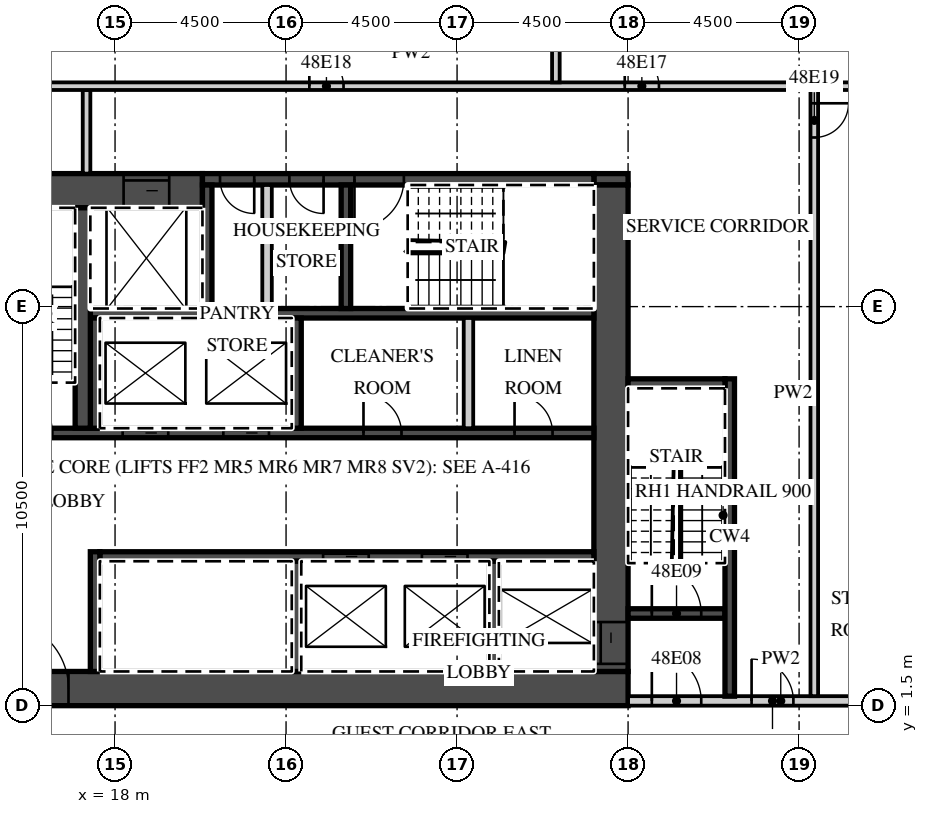
"""IFC4 building model, lengths in metres.
Left out: names, types, materials, properties, quantities, classifications, styles, units other than length and angle.
Written with IfcOpenShell. Run it as: python <this file> out.ifc"""

import sys

from ifc_helpers import new_model, si_unit, direction, frame, frame_2d, origin, place, context, subcontext, project, spatial, rectangle, extrude, element, fill, save


model = new_model("IFC4")
c1 = context("Model", 3, precision=1e-05, world=origin(), true_north=direction((0.0, 1.0)))
c2 = subcontext(c1, "Body", "Model", "MODEL_VIEW")
j1 = project(units=[si_unit("LENGTHUNIT", "METRE"), si_unit("PLANEANGLEUNIT", "RADIAN")], contexts=[c1])
p1 = place(None, origin())
s1 = spatial("IfcSite", under=j1, at=p1, CompositionType="ELEMENT")
p2 = place(p1, origin())
s2 = spatial("IfcBuilding", under=s1, at=p2, CompositionType="ELEMENT")
p3 = place(p2, frame((0.0, 0.0, 199.9)))
s3 = spatial("IfcBuildingStorey", under=s2, at=p3, CompositionType="ELEMENT", Elevation=199.9)
p4 = place(p3, frame((13.5, 1.95, 0.0), z_axis=(0.0, 0.0, 1.0), x_axis=(1.0, 0.0, 0.0)))
e1 = element("IfcWall", 1, at=p4, inside=s3, PredefinedType="SHEAR", context=c2, shape_type="SweptSolid", body=[
    extrude(rectangle(XDim=18.0, YDim=0.9, at=frame_2d((9.0, 0.0))), origin(), (0.0, 0.0, 1.0), 3.02),
])
p5 = place(p4, frame((1.475, 0.0, 0.0)))
e2 = element("IfcOpeningElement", 2, at=p5, cuts=e1, PredefinedType="OPENING", context=c2, shape_type="SweptSolid", body=[
    extrude(rectangle(XDim=1.8, YDim=2.1, at=frame_2d((0.9, 1.05))), frame((0.0, 0.46, 0.0), z_axis=(0.0, -1.0, 0.0), x_axis=(1.0, 0.0, 0.0)), (0.0, 0.0, 1.0), 0.92),
])
p6 = place(p3, frame((13.5, 15.05, 0.0), z_axis=(0.0, 0.0, 1.0), x_axis=(1.0, 0.0, 0.0)))
e3 = element("IfcWall", 3, at=p6, inside=s3, PredefinedType="SHEAR", context=c2, shape_type="SweptSolid", body=[
    extrude(rectangle(XDim=6.8, YDim=0.9, at=frame_2d((3.4, 0.0))), origin(), (0.0, 0.0, 1.0), 3.02),
])
p7 = place(p6, frame((4.725, 0.0, 0.0)))
e4 = element("IfcOpeningElement", 4, at=p7, cuts=e3, PredefinedType="OPENING", context=c2, shape_type="SweptSolid", body=[
    extrude(rectangle(XDim=1.2, YDim=2.1, at=frame_2d((0.6, 1.05))), frame((0.0, 0.46, 0.0), z_axis=(0.0, -1.0, 0.0), x_axis=(1.0, 0.0, 0.0)), (0.0, 0.0, 1.0), 0.92),
])
p8 = place(p3, frame((30.6, 15.35, 0.0), z_axis=(0.0, 0.0, 1.0), x_axis=(1.0, 0.0, 0.0)))
e5 = element("IfcWall", 5, at=p8, inside=s3, PredefinedType="SHEAR", context=c2, shape_type="SweptSolid", body=[
    extrude(rectangle(XDim=0.9, YDim=0.3, at=frame_2d((0.45, 0.0))), origin(), (0.0, 0.0, 1.0), 3.02),
])
p9 = place(p3, frame((20.3, 15.35, 0.0), z_axis=(0.0, 0.0, 1.0), x_axis=(1.0, 0.0, 0.0)))
e6 = element("IfcWall", 6, at=p9, inside=s3, PredefinedType="SHEAR", context=c2, shape_type="SweptSolid", body=[
    extrude(rectangle(XDim=10.3, YDim=0.3, at=frame_2d((5.15, 0.0))), origin(), (0.0, 0.0, 1.0), 3.02),
])
p10 = place(p9, frame((4.0, 0.0, 0.0)))
e7 = element("IfcOpeningElement", 7, at=p10, cuts=e6, PredefinedType="OPENING", context=c2, shape_type="SweptSolid", body=[
    extrude(rectangle(XDim=1.3, YDim=2.1, at=frame_2d((0.65, 1.05))), frame((0.0, 0.16, 0.0), z_axis=(0.0, -1.0, 0.0), x_axis=(1.0, 0.0, 0.0)), (0.0, 0.0, 1.0), 0.32),
])
p11 = place(p9, frame((2.288, 0.0, 0.0)))
e8 = element("IfcOpeningElement", 8, at=p11, cuts=e6, PredefinedType="OPENING", context=c2, shape_type="SweptSolid", body=[
    extrude(rectangle(XDim=0.9, YDim=2.1, at=frame_2d((0.45, 1.05))), frame((0.0, 0.16, 0.0), z_axis=(0.0, -1.0, 0.0), x_axis=(1.0, 0.0, 0.0)), (0.0, 0.0, 1.0), 0.32),
])
p12 = place(p9, frame((0.462, 0.0, 0.0)))
e9 = element("IfcOpeningElement", 9, at=p12, cuts=e6, PredefinedType="OPENING", context=c2, shape_type="SweptSolid", body=[
    extrude(rectangle(XDim=0.9, YDim=2.1, at=frame_2d((0.45, 1.05))), frame((0.0, 0.16, 0.0), z_axis=(0.0, -1.0, 0.0), x_axis=(1.0, 0.0, 0.0)), (0.0, 0.0, 1.0), 0.32),
])
p13 = place(p3, frame((31.05, 2.4, 0.0), z_axis=(0.0, 0.0, 1.0), x_axis=(0.0, 1.0, 0.0)))
e10 = element("IfcWall", 10, at=p13, inside=s3, PredefinedType="SHEAR", context=c2, shape_type="SweptSolid", body=[
    extrude(rectangle(XDim=12.8, YDim=0.9, at=frame_2d((6.4, 0.0))), origin(), (0.0, 0.0, 1.0), 3.02),
])
p14 = place(p13, frame((0.2, 0.0, 0.0)))
e11 = element("IfcOpeningElement", 11, at=p14, cuts=e10, PredefinedType="OPENING", context=c2, shape_type="SweptSolid", body=[
    extrude(rectangle(XDim=1.1, YDim=2.1, at=frame_2d((0.55, 1.05))), frame((0.0, 0.46, 0.0), z_axis=(0.0, -1.0, 0.0), x_axis=(1.0, 0.0, 0.0)), (0.0, 0.0, 1.0), 0.92),
])
p15 = place(p3, frame((17.6, 5.425, 0.0), z_axis=(0.0, 0.0, 1.0), x_axis=(1.0, 0.0, 0.0)))
e12 = element("IfcWall", 12, at=p15, inside=s3, PredefinedType="SHEAR", context=c2, shape_type="SweptSolid", body=[
    extrude(rectangle(XDim=13.0, YDim=0.25, at=frame_2d((6.5, 0.0))), origin(), (0.0, 0.0, 1.0), 3.02),
])
p16 = place(p15, frame((8.475, 0.0, 0.0)))
e13 = element("IfcOpeningElement", 13, at=p16, cuts=e12, PredefinedType="OPENING", context=c2, shape_type="SweptSolid", body=[
    extrude(rectangle(XDim=1.2, YDim=2.1, at=frame_2d((0.6, 1.05))), frame((0.0, 0.135, 0.0), z_axis=(0.0, -1.0, 0.0), x_axis=(1.0, 0.0, 0.0)), (0.0, 0.0, 1.0), 0.27),
])
p17 = place(p15, frame((5.875, 0.0, 0.0)))
e14 = element("IfcOpeningElement", 14, at=p17, cuts=e12, PredefinedType="OPENING", context=c2, shape_type="SweptSolid", body=[
    extrude(rectangle(XDim=1.2, YDim=2.1, at=frame_2d((0.6, 1.05))), frame((0.0, 0.135, 0.0), z_axis=(0.0, -1.0, 0.0), x_axis=(1.0, 0.0, 0.0)), (0.0, 0.0, 1.0), 0.27),
])
p18 = place(p3, frame((17.475, 2.4, 0.0), z_axis=(0.0, 0.0, 1.0), x_axis=(0.0, 1.0, 0.0)))
e15 = element("IfcWall", 15, at=p18, inside=s3, PredefinedType="SHEAR", context=c2, shape_type="SweptSolid", body=[
    extrude(rectangle(XDim=3.15, YDim=0.25, at=frame_2d((1.575, 0.0))), origin(), (0.0, 0.0, 1.0), 3.02),
])
for number, where, z_axis, x_axis in (
    (16, (27.975, 2.4, 0.0), (0.0, 0.0, 1.0), (0.0, 1.0, 0.0)),
    (17, (22.775, 2.4, 0.0), (0.0, 0.0, 1.0), (0.0, 1.0, 0.0)),
):
    element("IfcWall", number, at=place(p3, frame(where, z_axis=z_axis, x_axis=x_axis)), inside=s3, PredefinedType="SHEAR", context=c2, shape_type="SweptSolid", body=[
        extrude(rectangle(XDim=2.9, YDim=0.25, at=frame_2d((1.45, 0.0))), origin(), (0.0, 0.0, 1.0), 3.02),
    ])
p19 = place(p3, frame((14.4, 8.675, 0.0), z_axis=(0.0, 0.0, 1.0), x_axis=(1.0, 0.0, 0.0)))
e18 = element("IfcWall", 18, at=p19, inside=s3, PredefinedType="SHEAR", context=c2, shape_type="SweptSolid", body=[
    extrude(rectangle(XDim=16.2, YDim=0.25, at=frame_2d((8.1, 0.0))), origin(), (0.0, 0.0, 1.0), 3.02),
])
p20 = place(p19, frame((6.45, 0.0, 0.0)))
e19 = element("IfcOpeningElement", 19, at=p20, cuts=e18, PredefinedType="OPENING", context=c2, shape_type="SweptSolid", body=[
    extrude(rectangle(XDim=1.2, YDim=2.1, at=frame_2d((0.6, 1.05))), frame((0.0, 0.135, 0.0), z_axis=(0.0, -1.0, 0.0), x_axis=(1.0, 0.0, 0.0)), (0.0, 0.0, 1.0), 0.27),
])
p21 = place(p19, frame((3.8, 0.0, 0.0)))
e20 = element("IfcOpeningElement", 20, at=p21, cuts=e18, PredefinedType="OPENING", context=c2, shape_type="SweptSolid", body=[
    extrude(rectangle(XDim=1.2, YDim=2.1, at=frame_2d((0.6, 1.05))), frame((0.0, 0.135, 0.0), z_axis=(0.0, -1.0, 0.0), x_axis=(1.0, 0.0, 0.0)), (0.0, 0.0, 1.0), 0.27),
])
p22 = place(p19, frame((0.65, 0.0, 0.0)))
e21 = element("IfcOpeningElement", 21, at=p22, cuts=e18, PredefinedType="OPENING", context=c2, shape_type="SweptSolid", body=[
    extrude(rectangle(XDim=1.3, YDim=2.1, at=frame_2d((0.65, 1.05))), frame((0.0, 0.135, 0.0), z_axis=(0.0, -1.0, 0.0), x_axis=(1.0, 0.0, 0.0)), (0.0, 0.0, 1.0), 0.27),
])
p23 = place(p19, frame((14.113, 0.0, 0.0)))
e22 = element("IfcOpeningElement", 22, at=p23, cuts=e18, PredefinedType="OPENING", context=c2, shape_type="SweptSolid", body=[
    extrude(rectangle(XDim=1.0, YDim=2.1, at=frame_2d((0.5, 1.05))), frame((0.0, 0.135, 0.0), z_axis=(0.0, -1.0, 0.0), x_axis=(1.0, 0.0, 0.0)), (0.0, 0.0, 1.0), 0.27),
])
p24 = place(p19, frame((10.137, 0.0, 0.0)))
e23 = element("IfcOpeningElement", 23, at=p24, cuts=e18, PredefinedType="OPENING", context=c2, shape_type="SweptSolid", body=[
    extrude(rectangle(XDim=1.0, YDim=2.1, at=frame_2d((0.5, 1.05))), frame((0.0, 0.135, 0.0), z_axis=(0.0, -1.0, 0.0), x_axis=(1.0, 0.0, 0.0)), (0.0, 0.0, 1.0), 0.27),
])
p25 = place(p3, frame((17.35, 11.825, 0.0), z_axis=(0.0, 0.0, 1.0), x_axis=(1.0, 0.0, 0.0)))
e24 = element("IfcWall", 24, at=p25, inside=s3, PredefinedType="SHEAR", context=c2, shape_type="SweptSolid", body=[
    extrude(rectangle(XDim=13.25, YDim=0.25, at=frame_2d((6.625, 0.0))), origin(), (0.0, 0.0, 1.0), 3.02),
])
for number, where, z_axis, x_axis in (
    (25, (17.475, 8.8, 0.0), (0.0, 0.0, 1.0), (0.0, 1.0, 0.0)),
    (26, (22.775, 8.8, 0.0), (0.0, 0.0, 1.0), (0.0, 1.0, 0.0)),
):
    element("IfcWall", number, at=place(p3, frame(where, z_axis=z_axis, x_axis=x_axis)), inside=s3, PredefinedType="SHEAR", context=c2, shape_type="SweptSolid", body=[
        extrude(rectangle(XDim=2.9, YDim=0.25, at=frame_2d((1.45, 0.0))), origin(), (0.0, 0.0, 1.0), 3.02),
    ])
p26 = place(p3, frame((27.3, 8.8, 0.0), z_axis=(0.0, 0.0, 1.0), x_axis=(0.0, 1.0, 0.0)))
e27 = element("IfcWall", 27, at=p26, inside=s3, PredefinedType="PARTITIONING", context=c2, shape_type="SweptSolid", body=[
    extrude(rectangle(XDim=2.9, YDim=0.25, at=frame_2d((1.45, 0.0))), origin(), (0.0, 0.0, 1.0), 3.02),
])
p27 = place(p3, frame((17.15, 8.8, 0.0), z_axis=(0.0, 0.0, 1.0), x_axis=(0.0, 1.0, 0.0)))
e28 = element("IfcWall", 28, at=p27, inside=s3, PredefinedType="SHEAR", context=c2, shape_type="SweptSolid", body=[
    extrude(rectangle(XDim=5.8, YDim=0.4, at=frame_2d((2.9, 0.0))), origin(), (0.0, 0.0, 1.0), 3.02),
])
for number, where, z_axis, x_axis in (
    (29, (20.425, 11.95, 0.0), (0.0, 0.0, 1.0), (0.0, 1.0, 0.0)),
    (30, (24.075, 11.95, 0.0), (0.0, 0.0, 1.0), (0.0, 1.0, 0.0)),
):
    element("IfcWall", number, at=place(p3, frame(where, z_axis=z_axis, x_axis=x_axis)), inside=s3, PredefinedType="SHEAR", context=c2, shape_type="SweptSolid", body=[
        extrude(rectangle(XDim=3.25, YDim=0.25, at=frame_2d((1.625, 0.0))), origin(), (0.0, 0.0, 1.0), 3.02),
    ])
p28 = place(p3, frame((22.0, 11.95, 0.0), z_axis=(0.0, 0.0, 1.0), x_axis=(0.0, 1.0, 0.0)))
e31 = element("IfcWall", 31, at=p28, inside=s3, PredefinedType="PARTITIONING", context=c2, shape_type="SweptSolid", body=[
    extrude(rectangle(XDim=3.25, YDim=0.25, at=frame_2d((1.625, 0.0))), origin(), (0.0, 0.0, 1.0), 3.02),
])
p29 = place(p3, frame((31.5, 1.625, 0.0), z_axis=(0.0, 0.0, 1.0), x_axis=(1.0, 0.0, 0.0)))
e32 = element("IfcWall", 32, at=p29, inside=s3, PredefinedType="PARTITIONING", context=c2, shape_type="SweptSolid", body=[
    extrude(rectangle(XDim=8.035, YDim=0.25, at=frame_2d((4.018, 0.0))), origin(), (0.0, 0.0, 1.0), 3.02),
])
p30 = place(p29, frame((0.625, 0.0, 0.0)))
e33 = element("IfcOpeningElement", 33, at=p30, cuts=e32, PredefinedType="OPENING", context=c2, shape_type="SweptSolid", body=[
    extrude(rectangle(XDim=1.3, YDim=2.1, at=frame_2d((0.65, 1.05))), frame((0.0, 0.135, 0.0), z_axis=(0.0, -1.0, 0.0), x_axis=(1.0, 0.0, 0.0)), (0.0, 0.0, 1.0), 0.27),
])
p31 = place(p29, frame((3.25, 0.0, 0.0)))
e34 = element("IfcOpeningElement", 34, at=p31, cuts=e32, PredefinedType="OPENING", context=c2, shape_type="SweptSolid", body=[
    extrude(rectangle(XDim=1.1, YDim=2.1, at=frame_2d((0.55, 1.05))), frame((0.0, 0.135, 0.0), z_axis=(0.0, -1.0, 0.0), x_axis=(1.0, 0.0, 0.0)), (0.0, 0.0, 1.0), 0.27),
])
p32 = place(p3, frame((31.5, 3.925, 0.0), z_axis=(0.0, 0.0, 1.0), x_axis=(1.0, 0.0, 0.0)))
e35 = element("IfcWall", 35, at=p32, inside=s3, PredefinedType="SHEAR", context=c2, shape_type="SweptSolid", body=[
    extrude(rectangle(XDim=2.55, YDim=0.25, at=frame_2d((1.275, 0.0))), origin(), (0.0, 0.0, 1.0), 3.02),
])
p33 = place(p32, frame((0.625, 0.0, 0.0)))
e36 = element("IfcOpeningElement", 36, at=p33, cuts=e35, PredefinedType="OPENING", context=c2, shape_type="SweptSolid", body=[
    extrude(rectangle(XDim=1.3, YDim=2.1, at=frame_2d((0.65, 1.05))), frame((0.0, 0.135, 0.0), z_axis=(0.0, -1.0, 0.0), x_axis=(1.0, 0.0, 0.0)), (0.0, 0.0, 1.0), 0.27),
])
p34 = place(p3, frame((34.175, 1.75, 0.0), z_axis=(0.0, 0.0, 1.0), x_axis=(0.0, 1.0, 0.0)))
e37 = element("IfcWall", 37, at=p34, inside=s3, PredefinedType="SHEAR", context=c2, shape_type="SweptSolid", body=[
    extrude(rectangle(XDim=8.35, YDim=0.25, at=frame_2d((4.175, 0.0))), origin(), (0.0, 0.0, 1.0), 3.02),
])
p35 = place(p3, frame((31.5, 9.975, 0.0), z_axis=(0.0, 0.0, 1.0), x_axis=(1.0, 0.0, 0.0)))
e38 = element("IfcWall", 38, at=p35, inside=s3, PredefinedType="SHEAR", context=c2, shape_type="SweptSolid", body=[
    extrude(rectangle(XDim=2.55, YDim=0.25, at=frame_2d((1.275, 0.0))), origin(), (0.0, 0.0, 1.0), 3.02),
])
p36 = place(p3, frame((17.25, 15.5, 0.0), z_axis=(0.0, 0.0, 1.0), x_axis=(0.0, 1.0, 0.0)))
e39 = element("IfcWall", 39, at=p36, inside=s3, PredefinedType="PARTITIONING", context=c2, shape_type="SweptSolid", body=[
    extrude(rectangle(XDim=2.2, YDim=0.2, at=frame_2d((1.1, 0.0))), origin(), (0.0, 0.0, 1.0), 3.02),
])
p37 = place(p3, frame((36.4, 1.75, 0.0), z_axis=(0.0, 0.0, 1.0), x_axis=(0.0, 1.0, 0.0)))
e40 = element("IfcWall", 40, at=p37, inside=s3, PredefinedType="PARTITIONING", context=c2, shape_type="SweptSolid", body=[
    extrude(rectangle(XDim=15.95, YDim=0.2, at=frame_2d((7.975, 0.0))), origin(), (0.0, 0.0, 1.0), 3.02),
])
p38 = place(p37, frame((14.7, 0.0, 0.0)))
e41 = element("IfcOpeningElement", 41, at=p38, cuts=e40, PredefinedType="OPENING", context=c2, shape_type="SweptSolid", body=[
    extrude(rectangle(XDim=0.9, YDim=2.1, at=frame_2d((0.45, 1.05))), frame((0.0, 0.11, 0.0), z_axis=(0.0, -1.0, 0.0), x_axis=(1.0, 0.0, 0.0)), (0.0, 0.0, 1.0), 0.22),
])
p39 = place(p3, frame((13.6, 17.8, 0.0), z_axis=(0.0, 0.0, 1.0), x_axis=(1.0, 0.0, 0.0)))
e42 = element("IfcWall", 42, at=p39, inside=s3, PredefinedType="PARTITIONING", context=c2, shape_type="SweptSolid", body=[
    extrude(rectangle(XDim=24.378, YDim=0.2, at=frame_2d((12.189, 0.0))), origin(), (0.0, 0.0, 1.0), 3.02),
])
p40 = place(p39, frame((17.812, 0.0, 0.0)))
e43 = element("IfcOpeningElement", 43, at=p40, cuts=e42, PredefinedType="OPENING", context=c2, shape_type="SweptSolid", body=[
    extrude(rectangle(XDim=0.9, YDim=2.1, at=frame_2d((0.45, 1.05))), frame((0.0, 0.11, 0.0), z_axis=(0.0, -1.0, 0.0), x_axis=(1.0, 0.0, 0.0)), (0.0, 0.0, 1.0), 0.22),
])
p41 = place(p39, frame((9.512, 0.0, 0.0)))
e44 = element("IfcOpeningElement", 44, at=p41, cuts=e42, PredefinedType="OPENING", context=c2, shape_type="SweptSolid", body=[
    extrude(rectangle(XDim=0.9, YDim=2.1, at=frame_2d((0.45, 1.05))), frame((0.0, 0.11, 0.0), z_axis=(0.0, -1.0, 0.0), x_axis=(1.0, 0.0, 0.0)), (0.0, 0.0, 1.0), 0.22),
])
p42 = place(p3, frame((29.6, 17.9, 0.0), z_axis=(0.0, 0.0, 1.0), x_axis=(0.0, 1.0, 0.0)))
e45 = element("IfcWall", 45, at=p42, inside=s3, PredefinedType="PARTITIONING", context=c2, shape_type="SweptSolid", body=[
    extrude(rectangle(XDim=5.241, YDim=0.2, at=frame_2d((2.62, 0.0))), origin(), (0.0, 0.0, 1.0), 3.02),
])
p43 = place(p20, origin())
e46 = element("IfcDoor", 46, at=p43, inside=s3, OperationType="SLIDING_TO_LEFT", PredefinedType="DOOR", context=c2, shape_type="SweptSolid", body=[
    extrude(rectangle(XDim=1.2, YDim=2.1, at=frame_2d((0.6, 1.05))), frame((0.0, 0.025, 0.0), z_axis=(0.0, -1.0, 0.0), x_axis=(1.0, 0.0, 0.0)), (0.0, 0.0, 1.0), 0.05),
])
fill(e19, e46)
p44 = place(p21, origin())
e47 = element("IfcDoor", 47, at=p44, inside=s3, OperationType="SLIDING_TO_RIGHT", PredefinedType="DOOR", context=c2, shape_type="SweptSolid", body=[
    extrude(rectangle(XDim=1.2, YDim=2.1, at=frame_2d((0.6, 1.05))), frame((0.0, 0.025, 0.0), z_axis=(0.0, -1.0, 0.0), x_axis=(1.0, 0.0, 0.0)), (0.0, 0.0, 1.0), 0.05),
])
fill(e20, e47)
p45 = place(p16, origin())
e48 = element("IfcDoor", 48, at=p45, inside=s3, OperationType="SLIDING_TO_LEFT", PredefinedType="DOOR", context=c2, shape_type="SweptSolid", body=[
    extrude(rectangle(XDim=1.2, YDim=2.1, at=frame_2d((0.6, 1.05))), frame((0.0, 0.025, 0.0), z_axis=(0.0, -1.0, 0.0), x_axis=(1.0, 0.0, 0.0)), (0.0, 0.0, 1.0), 0.05),
])
fill(e13, e48)
p46 = place(p17, origin())
e49 = element("IfcDoor", 49, at=p46, inside=s3, OperationType="SLIDING_TO_RIGHT", PredefinedType="DOOR", context=c2, shape_type="SweptSolid", body=[
    extrude(rectangle(XDim=1.2, YDim=2.1, at=frame_2d((0.6, 1.05))), frame((0.0, 0.025, 0.0), z_axis=(0.0, -1.0, 0.0), x_axis=(1.0, 0.0, 0.0)), (0.0, 0.0, 1.0), 0.05),
])
fill(e14, e49)
p47 = place(p7, origin())
e50 = element("IfcDoor", 50, at=p47, inside=s3, OperationType="SLIDING_TO_LEFT", PredefinedType="DOOR", context=c2, shape_type="SweptSolid", body=[
    extrude(rectangle(XDim=1.2, YDim=2.1, at=frame_2d((0.6, 1.05))), frame((0.0, 0.025, 0.0), z_axis=(0.0, -1.0, 0.0), x_axis=(1.0, 0.0, 0.0)), (0.0, 0.0, 1.0), 0.05),
])
fill(e4, e50)
p48 = place(p14, origin())
e51 = element("IfcDoor", 51, at=p48, inside=s3, OperationType="SLIDING_TO_LEFT", PredefinedType="DOOR", context=c2, shape_type="SweptSolid", body=[
    extrude(rectangle(XDim=1.1, YDim=2.1, at=frame_2d((0.55, 1.05))), frame((0.0, 0.025, 0.0), z_axis=(0.0, -1.0, 0.0), x_axis=(1.0, 0.0, 0.0)), (0.0, 0.0, 1.0), 0.05),
])
fill(e11, e51)
p49 = place(p5, origin())
e52 = element("IfcDoor", 52, at=p49, inside=s3, OperationType="DOUBLE_DOOR_DOUBLE_SWING", PredefinedType="DOOR", context=c2, shape_type="SweptSolid", body=[
    extrude(rectangle(XDim=1.8, YDim=2.1, at=frame_2d((0.9, 1.05))), frame((0.0, 0.025, 0.0), z_axis=(0.0, -1.0, 0.0), x_axis=(1.0, 0.0, 0.0)), (0.0, 0.0, 1.0), 0.05),
])
fill(e2, e52)
p50 = place(p30, origin())
e53 = element("IfcDoor", 53, at=p50, inside=s3, OperationType="SINGLE_SWING_LEFT", PredefinedType="DOOR", context=c2, shape_type="SweptSolid", body=[
    extrude(rectangle(XDim=1.3, YDim=2.1, at=frame_2d((0.65, 1.05))), frame((0.0, 0.025, 0.0), z_axis=(0.0, -1.0, 0.0), x_axis=(1.0, 0.0, 0.0)), (0.0, 0.0, 1.0), 0.05),
])
fill(e33, e53)
p51 = place(p33, origin())
e54 = element("IfcDoor", 54, at=p51, inside=s3, OperationType="SINGLE_SWING_LEFT", PredefinedType="DOOR", context=c2, shape_type="SweptSolid", body=[
    extrude(rectangle(XDim=1.3, YDim=2.1, at=frame_2d((0.65, 1.05))), frame((0.0, 0.025, 0.0), z_axis=(0.0, -1.0, 0.0), x_axis=(1.0, 0.0, 0.0)), (0.0, 0.0, 1.0), 0.05),
])
fill(e36, e54)
p52 = place(p31, origin())
e55 = element("IfcDoor", 55, at=p52, inside=s3, OperationType="SINGLE_SWING_LEFT", PredefinedType="DOOR", context=c2, shape_type="SweptSolid", body=[
    extrude(rectangle(XDim=1.1, YDim=2.1, at=frame_2d((0.55, 1.05))), frame((0.0, 0.025, 0.0), z_axis=(0.0, -1.0, 0.0), x_axis=(1.0, 0.0, 0.0)), (0.0, 0.0, 1.0), 0.05),
])
fill(e34, e55)
p53 = place(p10, origin())
e56 = element("IfcDoor", 56, at=p53, inside=s3, OperationType="SINGLE_SWING_LEFT", PredefinedType="DOOR", context=c2, shape_type="SweptSolid", body=[
    extrude(rectangle(XDim=1.3, YDim=2.1, at=frame_2d((0.65, 1.05))), frame((0.0, 0.025, 0.0), z_axis=(0.0, -1.0, 0.0), x_axis=(1.0, 0.0, 0.0)), (0.0, 0.0, 1.0), 0.05),
])
fill(e7, e56)
p54 = place(p11, origin())
e57 = element("IfcDoor", 57, at=p54, inside=s3, OperationType="SINGLE_SWING_RIGHT", PredefinedType="DOOR", context=c2, shape_type="SweptSolid", body=[
    extrude(rectangle(XDim=0.9, YDim=2.1, at=frame_2d((0.45, 1.05))), frame((0.0, 0.025, 0.0), z_axis=(0.0, -1.0, 0.0), x_axis=(1.0, 0.0, 0.0)), (0.0, 0.0, 1.0), 0.05),
])
fill(e8, e57)
p55 = place(p12, origin())
e58 = element("IfcDoor", 58, at=p55, inside=s3, OperationType="SINGLE_SWING_RIGHT", PredefinedType="DOOR", context=c2, shape_type="SweptSolid", body=[
    extrude(rectangle(XDim=0.9, YDim=2.1, at=frame_2d((0.45, 1.05))), frame((0.0, 0.025, 0.0), z_axis=(0.0, -1.0, 0.0), x_axis=(1.0, 0.0, 0.0)), (0.0, 0.0, 1.0), 0.05),
])
fill(e9, e58)
p56 = place(p23, origin())
e59 = element("IfcDoor", 59, at=p56, inside=s3, OperationType="SINGLE_SWING_LEFT", PredefinedType="DOOR", context=c2, shape_type="SweptSolid", body=[
    extrude(rectangle(XDim=1.0, YDim=2.1, at=frame_2d((0.5, 1.05))), frame((0.0, 0.025, 0.0), z_axis=(0.0, -1.0, 0.0), x_axis=(1.0, 0.0, 0.0)), (0.0, 0.0, 1.0), 0.05),
])
fill(e22, e59)
p57 = place(p24, origin())
e60 = element("IfcDoor", 60, at=p57, inside=s3, OperationType="SINGLE_SWING_LEFT", PredefinedType="DOOR", context=c2, shape_type="SweptSolid", body=[
    extrude(rectangle(XDim=1.0, YDim=2.1, at=frame_2d((0.5, 1.05))), frame((0.0, 0.025, 0.0), z_axis=(0.0, -1.0, 0.0), x_axis=(1.0, 0.0, 0.0)), (0.0, 0.0, 1.0), 0.05),
])
fill(e23, e60)
p58 = place(p40, origin())
e61 = element("IfcDoor", 61, at=p58, inside=s3, OperationType="SINGLE_SWING_LEFT", PredefinedType="DOOR", context=c2, shape_type="SweptSolid", body=[
    extrude(rectangle(XDim=0.9, YDim=2.1, at=frame_2d((0.45, 1.05))), frame((0.0, 0.025, 0.0), z_axis=(0.0, -1.0, 0.0), x_axis=(1.0, 0.0, 0.0)), (0.0, 0.0, 1.0), 0.05),
])
fill(e43, e61)
p59 = place(p41, origin())
e62 = element("IfcDoor", 62, at=p59, inside=s3, OperationType="SINGLE_SWING_LEFT", PredefinedType="DOOR", context=c2, shape_type="SweptSolid", body=[
    extrude(rectangle(XDim=0.9, YDim=2.1, at=frame_2d((0.45, 1.05))), frame((0.0, 0.025, 0.0), z_axis=(0.0, -1.0, 0.0), x_axis=(1.0, 0.0, 0.0)), (0.0, 0.0, 1.0), 0.05),
])
fill(e44, e62)
p60 = place(p38, origin())
e63 = element("IfcDoor", 63, at=p60, inside=s3, OperationType="SINGLE_SWING_RIGHT", PredefinedType="DOOR", context=c2, shape_type="SweptSolid", body=[
    extrude(rectangle(XDim=0.9, YDim=2.1, at=frame_2d((0.45, 1.05))), frame((0.0, 0.025, 0.0), z_axis=(0.0, -1.0, 0.0), x_axis=(1.0, 0.0, 0.0)), (0.0, 0.0, 1.0), 0.05),
])
fill(e41, e63)
save(model, sys.argv[1])
